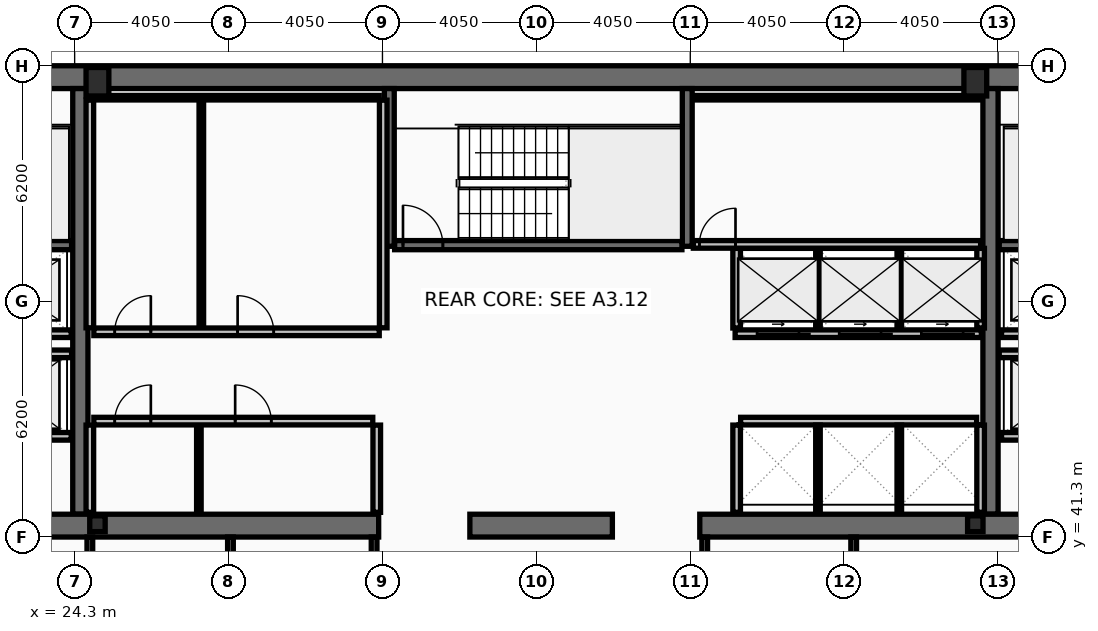
"""IFC4 building model, lengths in metres.
Left out: names, types, materials, properties, quantities, classifications, styles, units other than length and angle.
Written with IfcOpenShell. Run it as: python <this file> out.ifc"""

import sys

from ifc_helpers import new_model, si_unit, direction, frame, frame_2d, origin, origin_2d, place, context, subcontext, project, spatial, rectangle, hollow_rectangle, i_section, extrude, element, fill, save


model = new_model("IFC4")
c1 = context("Model", 3, precision=1e-05, world=origin(), true_north=direction((0.0, 1.0)))
c2 = subcontext(c1, "Body", "Model", "MODEL_VIEW")
j1 = project(units=[si_unit("LENGTHUNIT", "METRE"), si_unit("PLANEANGLEUNIT", "RADIAN")], contexts=[c1])
p1 = place(None, origin())
s1 = spatial("IfcSite", under=j1, at=p1, CompositionType="ELEMENT")
p2 = place(p1, origin())
s2 = spatial("IfcBuilding", under=s1, at=p2, CompositionType="ELEMENT")
p3 = place(p2, frame((0.0, 0.0, 231.8)))
s3 = spatial("IfcBuildingStorey", under=s2, at=p3, CompositionType="ELEMENT", Elevation=231.8)
p4 = place(p3, frame((16.2, 53.4, 0.0), z_axis=(0.0, 0.0, 1.0), x_axis=(1.0, 0.0, 0.0)))
e1 = element("IfcWall", 1, at=p4, inside=s3, PredefinedType="SHEAR", context=c2, shape_type="SweptSolid", body=[
    extrude(rectangle(XDim=40.5, YDim=0.6, at=frame_2d((20.25, 0.0))), origin(), (0.0, 0.0, 1.0), 3.44),
])
for number, where, z_axis, x_axis in (
    (2, (24.45, 41.9, 0.0), (0.0, 0.0, 1.0), (0.0, 1.0, 0.0)),
    (3, (48.4, 41.9, 0.0), (0.0, 0.0, 1.0), (0.0, 1.0, 0.0)),
):
    element("IfcWall", number, at=place(p3, frame(where, z_axis=z_axis, x_axis=x_axis)), inside=s3, PredefinedType="SHEAR", context=c2, shape_type="SweptSolid", body=[
        extrude(rectangle(XDim=11.2, YDim=0.4, at=frame_2d((5.6, 0.0))), origin(), (0.0, 0.0, 1.0), 3.44),
    ])
p5 = place(p3, frame((32.3, 41.6, 0.0), z_axis=(0.0, 0.0, 1.0), x_axis=(-1.0, 0.0, 0.0)))
e4 = element("IfcWall", 4, at=p5, inside=s3, PredefinedType="SHEAR", context=c2, shape_type="SweptSolid", body=[
    extrude(rectangle(XDim=11.45, YDim=0.6, at=frame_2d((5.725, 0.0))), origin(), (0.0, 0.0, 1.0), 3.44),
])
p6 = place(p3, frame((38.45, 41.6, 0.0), z_axis=(0.0, 0.0, 1.0), x_axis=(-1.0, 0.0, 0.0)))
e5 = element("IfcWall", 5, at=p6, inside=s3, PredefinedType="SHEAR", context=c2, shape_type="SweptSolid", body=[
    extrude(rectangle(XDim=3.75, YDim=0.6, at=frame_2d((1.875, 0.0))), origin(), (0.0, 0.0, 1.0), 3.44),
])
p7 = place(p3, frame((52.05, 41.6, 0.0), z_axis=(0.0, 0.0, 1.0), x_axis=(-1.0, 0.0, 0.0)))
e6 = element("IfcWall", 6, at=p7, inside=s3, PredefinedType="SHEAR", context=c2, shape_type="SweptSolid", body=[
    extrude(rectangle(XDim=11.3, YDim=0.6, at=frame_2d((5.65, 0.0))), origin(), (0.0, 0.0, 1.0), 3.44),
])
for number, where, z_axis, x_axis in (
    (7, (32.58, 48.95, 0.0), (0.0, 0.0, 1.0), (0.0, 1.0, 0.0)),
    (8, (40.42, 48.95, 0.0), (0.0, 0.0, 1.0), (0.0, 1.0, 0.0)),
):
    element("IfcWall", number, at=place(p3, frame(where, z_axis=z_axis, x_axis=x_axis)), inside=s3, PredefinedType="SHEAR", context=c2, shape_type="SweptSolid", body=[
        extrude(rectangle(XDim=4.15, YDim=0.26, at=frame_2d((2.075, 0.0))), origin(), (0.0, 0.0, 1.0), 3.44),
    ])
p8 = place(p3, frame((16.8, 48.98, 0.0), z_axis=(0.0, 0.0, 1.0), x_axis=(1.0, 0.0, 0.0)))
e9 = element("IfcWall", 9, at=p8, inside=s3, PredefinedType="SHEAR", context=c2, shape_type="SweptSolid", body=[
    extrude(rectangle(XDim=7.42, YDim=0.24, at=frame_2d((3.71, 0.0))), origin(), (0.0, 0.0, 1.0), 3.44),
])
p9 = place(p8, frame((0.22, 0.0, 0.0)))
e10 = element("IfcOpeningElement", 10, at=p9, cuts=e9, PredefinedType="OPENING", context=c2, shape_type="SweptSolid", body=[
    extrude(rectangle(XDim=1.05, YDim=2.15, at=frame_2d((0.525, 1.075))), frame((0.0, 0.13, 0.0), z_axis=(0.0, -1.0, 0.0), x_axis=(1.0, 0.0, 0.0)), (0.0, 0.0, 1.0), 0.26),
])
p10 = place(p3, frame((48.63, 48.98, 0.0), z_axis=(0.0, 0.0, 1.0), x_axis=(1.0, 0.0, 0.0)))
e11 = element("IfcWall", 11, at=p10, inside=s3, PredefinedType="SHEAR", context=c2, shape_type="SweptSolid", body=[
    extrude(rectangle(XDim=7.47, YDim=0.24, at=frame_2d((3.735, 0.0))), origin(), (0.0, 0.0, 1.0), 3.44),
])
p11 = place(p10, frame((6.2, 0.0, 0.0)))
e12 = element("IfcOpeningElement", 12, at=p11, cuts=e11, PredefinedType="OPENING", context=c2, shape_type="SweptSolid", body=[
    extrude(rectangle(XDim=1.05, YDim=2.15, at=frame_2d((0.525, 1.075))), frame((0.0, 0.13, 0.0), z_axis=(0.0, -1.0, 0.0), x_axis=(1.0, 0.0, 0.0)), (0.0, 0.0, 1.0), 0.26),
])
p12 = place(p3, frame((32.72, 48.98, 0.0), z_axis=(0.0, 0.0, 1.0), x_axis=(1.0, 0.0, 0.0)))
e13 = element("IfcWall", 13, at=p12, inside=s3, PredefinedType="SHEAR", context=c2, shape_type="SweptSolid", body=[
    extrude(rectangle(XDim=7.56, YDim=0.24, at=frame_2d((3.78, 0.0))), origin(), (0.0, 0.0, 1.0), 3.44),
])
p13 = place(p12, frame((0.22, 0.0, 0.0)))
e14 = element("IfcOpeningElement", 14, at=p13, cuts=e13, PredefinedType="OPENING", context=c2, shape_type="SweptSolid", body=[
    extrude(rectangle(XDim=1.05, YDim=2.15, at=frame_2d((0.525, 1.075))), frame((0.0, 0.13, 0.0), z_axis=(0.0, -1.0, 0.0), x_axis=(1.0, 0.0, 0.0)), (0.0, 0.0, 1.0), 0.26),
])
for number, where, z_axis, x_axis in (
    (15, (24.9, 53.28, 0.0), (0.0, 0.0, 1.0), (1.0, 0.0, 0.0)),
    (16, (48.0, 53.28, 0.0), (0.0, 0.0, 1.0), (1.0, 0.0, 0.0)),
):
    element("IfcColumn", number, at=place(p3, frame(where, z_axis=z_axis, x_axis=x_axis)), inside=s3, PredefinedType="COLUMN", context=c2, shape_type="SweptSolid", body=[
        extrude(hollow_rectangle(XDim=0.6, YDim=0.75, WallThickness=0.045, at=origin_2d()), origin(), (0.0, 0.0, 1.0), 3.6),
    ])
for number, where, z_axis, x_axis in (
    (17, (24.9, 41.65, 0.0), (0.0, 0.0, 1.0), (1.0, 0.0, 0.0)),
    (18, (48.0, 41.65, 0.0), (0.0, 0.0, 1.0), (1.0, 0.0, 0.0)),
):
    element("IfcColumn", number, at=place(p3, frame(where, z_axis=z_axis, x_axis=x_axis)), inside=s3, PredefinedType="COLUMN", context=c2, shape_type="SweptSolid", body=[
        extrude(i_section(OverallWidth=0.406, OverallDepth=0.416, WebThickness=0.03, FlangeThickness=0.048, at=origin_2d()), origin(), (0.0, 0.0, 1.0), 3.6),
    ])
p14 = place(p3, frame((51.61, 43.95, 0.0), z_axis=(0.0, 0.0, 1.0), x_axis=(-1.0, 0.0, 0.0)))
e19 = element("IfcWall", 19, at=p14, inside=s3, PredefinedType="PARTITIONING", context=c2, shape_type="SweptSolid", body=[
    extrude(rectangle(XDim=2.92, YDim=0.2, at=frame_2d((1.46, 0.0))), origin(), (0.0, 0.0, 1.0), 3.44),
])
p15 = place(p14, frame((0.81, 0.0, 0.0)))
e20 = element("IfcOpeningElement", 20, at=p15, cuts=e19, PredefinedType="OPENING", context=c2, shape_type="SweptSolid", body=[
    extrude(rectangle(XDim=1.3, YDim=2.18, at=frame_2d((0.65, 1.09))), frame((0.0, 0.11, 0.0), z_axis=(0.0, -1.0, 0.0), x_axis=(1.0, 0.0, 0.0)), (0.0, 0.0, 1.0), 0.22),
])
p16 = place(p3, frame((24.21, 43.95, 0.0), z_axis=(0.0, 0.0, 1.0), x_axis=(-1.0, 0.0, 0.0)))
e21 = element("IfcWall", 21, at=p16, inside=s3, PredefinedType="PARTITIONING", context=c2, shape_type="SweptSolid", body=[
    extrude(rectangle(XDim=2.97, YDim=0.2, at=frame_2d((1.485, 0.0))), origin(), (0.0, 0.0, 1.0), 3.44),
])
p17 = place(p16, frame((0.86, 0.0, 0.0)))
e22 = element("IfcOpeningElement", 22, at=p17, cuts=e21, PredefinedType="OPENING", context=c2, shape_type="SweptSolid", body=[
    extrude(rectangle(XDim=1.3, YDim=2.18, at=frame_2d((0.65, 1.09))), frame((0.0, 0.11, 0.0), z_axis=(0.0, -1.0, 0.0), x_axis=(1.0, 0.0, 0.0)), (0.0, 0.0, 1.0), 0.22),
])
p18 = place(p3, frame((51.61, 46.65, 0.0), z_axis=(0.0, 0.0, 1.0), x_axis=(-1.0, 0.0, 0.0)))
e23 = element("IfcWall", 23, at=p18, inside=s3, PredefinedType="PARTITIONING", context=c2, shape_type="SweptSolid", body=[
    extrude(rectangle(XDim=2.92, YDim=0.2, at=frame_2d((1.46, 0.0))), origin(), (0.0, 0.0, 1.0), 3.44),
])
p19 = place(p18, frame((0.86, 0.0, 0.0)))
e24 = element("IfcOpeningElement", 24, at=p19, cuts=e23, PredefinedType="OPENING", context=c2, shape_type="SweptSolid", body=[
    extrude(rectangle(XDim=1.2, YDim=2.18, at=frame_2d((0.6, 1.09))), frame((0.0, 0.11, 0.0), z_axis=(0.0, -1.0, 0.0), x_axis=(1.0, 0.0, 0.0)), (0.0, 0.0, 1.0), 0.22),
])
p20 = place(p3, frame((24.21, 46.65, 0.0), z_axis=(0.0, 0.0, 1.0), x_axis=(-1.0, 0.0, 0.0)))
e25 = element("IfcWall", 25, at=p20, inside=s3, PredefinedType="PARTITIONING", context=c2, shape_type="SweptSolid", body=[
    extrude(rectangle(XDim=2.97, YDim=0.2, at=frame_2d((1.485, 0.0))), origin(), (0.0, 0.0, 1.0), 3.44),
])
p21 = place(p20, frame((0.91, 0.0, 0.0)))
e26 = element("IfcOpeningElement", 26, at=p21, cuts=e25, PredefinedType="OPENING", context=c2, shape_type="SweptSolid", body=[
    extrude(rectangle(XDim=1.2, YDim=2.18, at=frame_2d((0.6, 1.09))), frame((0.0, 0.11, 0.0), z_axis=(0.0, -1.0, 0.0), x_axis=(1.0, 0.0, 0.0)), (0.0, 0.0, 1.0), 0.22),
])
p22 = place(p3, frame((48.16, 46.65, 0.0), z_axis=(0.0, 0.0, 1.0), x_axis=(-1.0, 0.0, 0.0)))
e27 = element("IfcWall", 27, at=p22, inside=s3, PredefinedType="PARTITIONING", context=c2, shape_type="SweptSolid", body=[
    extrude(rectangle(XDim=6.48, YDim=0.2, at=frame_2d((3.24, 0.0))), origin(), (0.0, 0.0, 1.0), 3.44),
])
p23 = place(p22, frame((4.8, 0.0, 0.0)))
e28 = element("IfcOpeningElement", 28, at=p23, cuts=e27, PredefinedType="OPENING", context=c2, shape_type="SweptSolid", body=[
    extrude(rectangle(XDim=1.1, YDim=2.18, at=frame_2d((0.55, 1.09))), frame((0.0, 0.11, 0.0), z_axis=(0.0, -1.0, 0.0), x_axis=(1.0, 0.0, 0.0)), (0.0, 0.0, 1.0), 0.22),
])
p24 = place(p22, frame((2.64, 0.0, 0.0)))
e29 = element("IfcOpeningElement", 29, at=p24, cuts=e27, PredefinedType="OPENING", context=c2, shape_type="SweptSolid", body=[
    extrude(rectangle(XDim=1.1, YDim=2.18, at=frame_2d((0.55, 1.09))), frame((0.0, 0.11, 0.0), z_axis=(0.0, -1.0, 0.0), x_axis=(1.0, 0.0, 0.0)), (0.0, 0.0, 1.0), 0.22),
])
p25 = place(p22, frame((0.48, 0.0, 0.0)))
e30 = element("IfcOpeningElement", 30, at=p25, cuts=e27, PredefinedType="OPENING", context=c2, shape_type="SweptSolid", body=[
    extrude(rectangle(XDim=1.1, YDim=2.18, at=frame_2d((0.55, 1.09))), frame((0.0, 0.11, 0.0), z_axis=(0.0, -1.0, 0.0), x_axis=(1.0, 0.0, 0.0)), (0.0, 0.0, 1.0), 0.22),
])
p26 = place(p3, frame((21.2, 46.12, 0.0), z_axis=(0.0, 0.0, 1.0), x_axis=(1.0, 0.0, 0.0)))
e31 = element("IfcWall", 31, at=p26, inside=s3, PredefinedType="PARTITIONING", context=c2, shape_type="SweptSolid", body=[
    extrude(rectangle(XDim=3.02, YDim=0.2, at=frame_2d((1.51, 0.0))), origin(), (0.0, 0.0, 1.0), 3.44),
])
p27 = place(p3, frame((48.63, 46.12, 0.0), z_axis=(0.0, 0.0, 1.0), x_axis=(1.0, 0.0, 0.0)))
e32 = element("IfcWall", 32, at=p27, inside=s3, PredefinedType="PARTITIONING", context=c2, shape_type="SweptSolid", body=[
    extrude(rectangle(XDim=3.07, YDim=0.2, at=frame_2d((1.535, 0.0))), origin(), (0.0, 0.0, 1.0), 3.44),
])
for number, where, z_axis, x_axis in (
    (33, (24.7, 46.805, 0.0), (0.0, 0.0, 1.0), (0.0, 1.0, 0.0)),
    (34, (32.42, 46.805, 0.0), (0.0, 0.0, 1.0), (0.0, 1.0, 0.0)),
):
    element("IfcWall", number, at=place(p3, frame(where, z_axis=z_axis, x_axis=x_axis)), inside=s3, PredefinedType="PARTITIONING", context=c2, shape_type="SweptSolid", body=[
        extrude(rectangle(XDim=5.99, YDim=0.2, at=frame_2d((2.995, 0.0))), origin(), (0.0, 0.0, 1.0), 3.44),
    ])
p28 = place(p3, frame((24.805, 52.86, 0.0), z_axis=(0.0, 0.0, 1.0), x_axis=(1.0, 0.0, 0.0)))
e35 = element("IfcWall", 35, at=p28, inside=s3, PredefinedType="PARTITIONING", context=c2, shape_type="SweptSolid", body=[
    extrude(rectangle(XDim=7.51, YDim=0.12, at=frame_2d((3.755, 0.0))), origin(), (0.0, 0.0, 1.0), 3.44),
])
p29 = place(p3, frame((27.634, 46.805, 0.0), z_axis=(0.0, 0.0, 1.0), x_axis=(0.0, 1.0, 0.0)))
e36 = element("IfcWall", 36, at=p29, inside=s3, PredefinedType="PARTITIONING", context=c2, shape_type="SweptSolid", body=[
    extrude(rectangle(XDim=5.99, YDim=0.12, at=frame_2d((2.995, 0.0))), origin(), (0.0, 0.0, 1.0), 3.44),
])
p30 = place(p3, frame((24.805, 46.7, 0.0), z_axis=(0.0, 0.0, 1.0), x_axis=(1.0, 0.0, 0.0)))
e37 = element("IfcWall", 37, at=p30, inside=s3, PredefinedType="PARTITIONING", context=c2, shape_type="SweptSolid", body=[
    extrude(rectangle(XDim=7.51, YDim=0.2, at=frame_2d((3.755, 0.0))), origin(), (0.0, 0.0, 1.0), 3.44),
])
p31 = place(p30, frame((0.55, 0.0, 0.0)))
e38 = element("IfcOpeningElement", 38, at=p31, cuts=e37, PredefinedType="OPENING", context=c2, shape_type="SweptSolid", body=[
    extrude(rectangle(XDim=0.95, YDim=2.1, at=frame_2d((0.475, 1.05))), frame((0.0, 0.11, 0.0), z_axis=(0.0, -1.0, 0.0), x_axis=(1.0, 0.0, 0.0)), (0.0, 0.0, 1.0), 0.22),
])
p32 = place(p30, frame((3.784, 0.0, 0.0)))
e39 = element("IfcOpeningElement", 39, at=p32, cuts=e37, PredefinedType="OPENING", context=c2, shape_type="SweptSolid", body=[
    extrude(rectangle(XDim=0.95, YDim=2.1, at=frame_2d((0.475, 1.05))), frame((0.0, 0.11, 0.0), z_axis=(0.0, -1.0, 0.0), x_axis=(1.0, 0.0, 0.0)), (0.0, 0.0, 1.0), 0.22),
])
for number, where, z_axis, x_axis in (
    (40, (24.7, 41.95, 0.0), (0.0, 0.0, 1.0), (0.0, 1.0, 0.0)),
    (41, (32.25, 41.95, 0.0), (0.0, 0.0, 1.0), (0.0, 1.0, 0.0)),
):
    element("IfcWall", number, at=place(p3, frame(where, z_axis=z_axis, x_axis=x_axis)), inside=s3, PredefinedType="PARTITIONING", context=c2, shape_type="SweptSolid", body=[
        extrude(rectangle(XDim=2.295, YDim=0.2, at=frame_2d((1.147, 0.0))), origin(), (0.0, 0.0, 1.0), 3.44),
    ])
p33 = place(p3, frame((27.569, 41.95, 0.0), z_axis=(0.0, 0.0, 1.0), x_axis=(0.0, 1.0, 0.0)))
e42 = element("IfcWall", 42, at=p33, inside=s3, PredefinedType="PARTITIONING", context=c2, shape_type="SweptSolid", body=[
    extrude(rectangle(XDim=2.295, YDim=0.12, at=frame_2d((1.147, 0.0))), origin(), (0.0, 0.0, 1.0), 3.44),
])
p34 = place(p3, frame((24.805, 44.35, 0.0), z_axis=(0.0, 0.0, 1.0), x_axis=(1.0, 0.0, 0.0)))
e43 = element("IfcWall", 43, at=p34, inside=s3, PredefinedType="PARTITIONING", context=c2, shape_type="SweptSolid", body=[
    extrude(rectangle(XDim=7.34, YDim=0.2, at=frame_2d((3.67, 0.0))), origin(), (0.0, 0.0, 1.0), 3.44),
])
p35 = place(p34, frame((0.55, 0.0, 0.0)))
e44 = element("IfcOpeningElement", 44, at=p35, cuts=e43, PredefinedType="OPENING", context=c2, shape_type="SweptSolid", body=[
    extrude(rectangle(XDim=0.95, YDim=2.1, at=frame_2d((0.475, 1.05))), frame((0.0, 0.11, 0.0), z_axis=(0.0, -1.0, 0.0), x_axis=(1.0, 0.0, 0.0)), (0.0, 0.0, 1.0), 0.22),
])
p36 = place(p34, frame((3.719, 0.0, 0.0)))
e45 = element("IfcOpeningElement", 45, at=p36, cuts=e43, PredefinedType="OPENING", context=c2, shape_type="SweptSolid", body=[
    extrude(rectangle(XDim=0.95, YDim=2.1, at=frame_2d((0.475, 1.05))), frame((0.0, 0.11, 0.0), z_axis=(0.0, -1.0, 0.0), x_axis=(1.0, 0.0, 0.0)), (0.0, 0.0, 1.0), 0.22),
])
for number, where, z_axis, x_axis in (
    (46, (41.72, 46.8, 0.0), (0.0, 0.0, 1.0), (0.0, 1.0, 0.0)),
    (47, (48.14, 46.8, 0.0), (0.0, 0.0, 1.0), (0.0, 1.0, 0.0)),
):
    element("IfcWall", number, at=place(p3, frame(where, z_axis=z_axis, x_axis=x_axis)), inside=s3, PredefinedType="PARTITIONING", context=c2, shape_type="SweptSolid", body=[
        extrude(rectangle(XDim=2.095, YDim=0.2, at=frame_2d((1.047, 0.0))), origin(), (0.0, 0.0, 1.0), 3.44),
    ])
for number, where, z_axis, x_axis in (
    (48, (43.86, 46.8, 0.0), (0.0, 0.0, 1.0), (0.0, 1.0, 0.0)),
    (49, (46.0, 46.8, 0.0), (0.0, 0.0, 1.0), (0.0, 1.0, 0.0)),
):
    element("IfcWall", number, at=place(p3, frame(where, z_axis=z_axis, x_axis=x_axis)), inside=s3, PredefinedType="PARTITIONING", context=c2, shape_type="SweptSolid", body=[
        extrude(rectangle(XDim=2.095, YDim=0.12, at=frame_2d((1.047, 0.0))), origin(), (0.0, 0.0, 1.0), 3.44),
    ])
p37 = place(p3, frame((41.825, 44.35, 0.0), z_axis=(0.0, 0.0, 1.0), x_axis=(1.0, 0.0, 0.0)))
e50 = element("IfcWall", 50, at=p37, inside=s3, PredefinedType="PARTITIONING", context=c2, shape_type="SweptSolid", body=[
    extrude(rectangle(XDim=6.21, YDim=0.2, at=frame_2d((3.105, 0.0))), origin(), (0.0, 0.0, 1.0), 3.44),
])
for number, where, z_axis, x_axis in (
    (51, (41.72, 41.95, 0.0), (0.0, 0.0, 1.0), (0.0, 1.0, 0.0)),
    (52, (48.14, 41.95, 0.0), (0.0, 0.0, 1.0), (0.0, 1.0, 0.0)),
):
    element("IfcWall", number, at=place(p3, frame(where, z_axis=z_axis, x_axis=x_axis)), inside=s3, PredefinedType="PARTITIONING", context=c2, shape_type="SweptSolid", body=[
        extrude(rectangle(XDim=2.295, YDim=0.2, at=frame_2d((1.147, 0.0))), origin(), (0.0, 0.0, 1.0), 3.44),
    ])
for number, where, z_axis, x_axis in (
    (53, (43.86, 41.95, 0.0), (0.0, 0.0, 1.0), (0.0, 1.0, 0.0)),
    (54, (46.0, 41.95, 0.0), (0.0, 0.0, 1.0), (0.0, 1.0, 0.0)),
):
    element("IfcWall", number, at=place(p3, frame(where, z_axis=z_axis, x_axis=x_axis)), inside=s3, PredefinedType="PARTITIONING", context=c2, shape_type="SweptSolid", body=[
        extrude(rectangle(XDim=2.295, YDim=0.12, at=frame_2d((1.147, 0.0))), origin(), (0.0, 0.0, 1.0), 3.44),
    ])
p38 = place(p3, frame((40.58, 52.86, 0.0), z_axis=(0.0, 0.0, 1.0), x_axis=(1.0, 0.0, 0.0)))
e55 = element("IfcWall", 55, at=p38, inside=s3, PredefinedType="PARTITIONING", context=c2, shape_type="SweptSolid", body=[
    extrude(rectangle(XDim=7.56, YDim=0.12, at=frame_2d((3.78, 0.0))), origin(), (0.0, 0.0, 1.0), 3.44),
])
p39 = place(p3, frame((40.58, 49.0, 0.0), z_axis=(0.0, 0.0, 1.0), x_axis=(1.0, 0.0, 0.0)))
e56 = element("IfcWall", 56, at=p39, inside=s3, PredefinedType="PARTITIONING", context=c2, shape_type="SweptSolid", body=[
    extrude(rectangle(XDim=7.56, YDim=0.2, at=frame_2d((3.78, 0.0))), origin(), (0.0, 0.0, 1.0), 3.44),
])
p40 = place(p39, frame((0.16, 0.0, 0.0)))
e57 = element("IfcOpeningElement", 57, at=p40, cuts=e56, PredefinedType="OPENING", context=c2, shape_type="SweptSolid", body=[
    extrude(rectangle(XDim=0.95, YDim=2.1, at=frame_2d((0.475, 1.05))), frame((0.0, 0.11, 0.0), z_axis=(0.0, -1.0, 0.0), x_axis=(1.0, 0.0, 0.0)), (0.0, 0.0, 1.0), 0.22),
])
p41 = place(p3, frame((24.7, 38.28, 0.0), z_axis=(0.0, 0.0, 1.0), x_axis=(0.0, 1.0, 0.0)))
e58 = element("IfcWall", 58, at=p41, inside=s3, PredefinedType="PARTITIONING", context=c2, shape_type="SweptSolid", body=[
    extrude(rectangle(XDim=3.02, YDim=0.15, at=frame_2d((1.51, 0.0))), origin(), (0.0, 0.0, 1.0), 2.78),
])
for number, where, z_axis, x_axis in (
    (59, (28.4, 38.28, 0.0), (0.0, 0.0, 1.0), (0.0, 1.0, 0.0)),
    (60, (32.18, 38.28, 0.0), (0.0, 0.0, 1.0), (0.0, 1.0, 0.0)),
    (61, (40.88, 38.28, 0.0), (0.0, 0.0, 1.0), (0.0, 1.0, 0.0)),
    (62, (44.8, 38.28, 0.0), (0.0, 0.0, 1.0), (0.0, 1.0, 0.0)),
):
    element("IfcWall", number, at=place(p3, frame(where, z_axis=z_axis, x_axis=x_axis)), inside=s3, PredefinedType="PARTITIONING", context=c2, shape_type="SweptSolid", body=[
        extrude(rectangle(XDim=3.02, YDim=0.15, at=frame_2d((1.51, 0.0))), origin(), (0.0, 0.0, 1.0), 3.44),
    ])
p42 = place(p13, origin())
e63 = element("IfcDoor", 63, at=p42, inside=s3, OperationType="SINGLE_SWING_LEFT", PredefinedType="DOOR", context=c2, shape_type="SweptSolid", body=[
    extrude(rectangle(XDim=1.05, YDim=2.15, at=frame_2d((0.525, 1.075))), frame((0.0, 0.025, 0.0), z_axis=(0.0, -1.0, 0.0), x_axis=(1.0, 0.0, 0.0)), (0.0, 0.0, 1.0), 0.05),
])
fill(e14, e63)
p43 = place(p23, origin())
e64 = element("IfcDoor", 64, at=p43, inside=s3, OperationType="SLIDING_TO_LEFT", PredefinedType="DOOR", context=c2, shape_type="SweptSolid", body=[
    extrude(rectangle(XDim=1.1, YDim=2.18, at=frame_2d((0.55, 1.09))), frame((0.0, 0.025, 0.0), z_axis=(0.0, -1.0, 0.0), x_axis=(1.0, 0.0, 0.0)), (0.0, 0.0, 1.0), 0.05),
])
fill(e28, e64)
p44 = place(p24, origin())
e65 = element("IfcDoor", 65, at=p44, inside=s3, OperationType="SLIDING_TO_LEFT", PredefinedType="DOOR", context=c2, shape_type="SweptSolid", body=[
    extrude(rectangle(XDim=1.1, YDim=2.18, at=frame_2d((0.55, 1.09))), frame((0.0, 0.025, 0.0), z_axis=(0.0, -1.0, 0.0), x_axis=(1.0, 0.0, 0.0)), (0.0, 0.0, 1.0), 0.05),
])
fill(e29, e65)
p45 = place(p25, origin())
e66 = element("IfcDoor", 66, at=p45, inside=s3, OperationType="SLIDING_TO_LEFT", PredefinedType="DOOR", context=c2, shape_type="SweptSolid", body=[
    extrude(rectangle(XDim=1.1, YDim=2.18, at=frame_2d((0.55, 1.09))), frame((0.0, 0.025, 0.0), z_axis=(0.0, -1.0, 0.0), x_axis=(1.0, 0.0, 0.0)), (0.0, 0.0, 1.0), 0.05),
])
fill(e30, e66)
p46 = place(p31, origin())
e67 = element("IfcDoor", 67, at=p46, inside=s3, OperationType="SINGLE_SWING_RIGHT", PredefinedType="DOOR", context=c2, shape_type="SweptSolid", body=[
    extrude(rectangle(XDim=0.95, YDim=2.1, at=frame_2d((0.475, 1.05))), frame((0.0, 0.025, 0.0), z_axis=(0.0, -1.0, 0.0), x_axis=(1.0, 0.0, 0.0)), (0.0, 0.0, 1.0), 0.05),
])
fill(e38, e67)
p47 = place(p32, origin())
e68 = element("IfcDoor", 68, at=p47, inside=s3, OperationType="SINGLE_SWING_LEFT", PredefinedType="DOOR", context=c2, shape_type="SweptSolid", body=[
    extrude(rectangle(XDim=0.95, YDim=2.1, at=frame_2d((0.475, 1.05))), frame((0.0, 0.025, 0.0), z_axis=(0.0, -1.0, 0.0), x_axis=(1.0, 0.0, 0.0)), (0.0, 0.0, 1.0), 0.05),
])
fill(e39, e68)
p48 = place(p35, origin())
e69 = element("IfcDoor", 69, at=p48, inside=s3, OperationType="SINGLE_SWING_RIGHT", PredefinedType="DOOR", context=c2, shape_type="SweptSolid", body=[
    extrude(rectangle(XDim=0.95, YDim=2.1, at=frame_2d((0.475, 1.05))), frame((0.0, 0.025, 0.0), z_axis=(0.0, -1.0, 0.0), x_axis=(1.0, 0.0, 0.0)), (0.0, 0.0, 1.0), 0.05),
])
fill(e44, e69)
p49 = place(p36, origin())
e70 = element("IfcDoor", 70, at=p49, inside=s3, OperationType="SINGLE_SWING_LEFT", PredefinedType="DOOR", context=c2, shape_type="SweptSolid", body=[
    extrude(rectangle(XDim=0.95, YDim=2.1, at=frame_2d((0.475, 1.05))), frame((0.0, 0.025, 0.0), z_axis=(0.0, -1.0, 0.0), x_axis=(1.0, 0.0, 0.0)), (0.0, 0.0, 1.0), 0.05),
])
fill(e45, e70)
p50 = place(p40, origin())
e71 = element("IfcDoor", 71, at=p50, inside=s3, OperationType="SINGLE_SWING_RIGHT", PredefinedType="DOOR", context=c2, shape_type="SweptSolid", body=[
    extrude(rectangle(XDim=0.95, YDim=2.1, at=frame_2d((0.475, 1.05))), frame((0.0, 0.025, 0.0), z_axis=(0.0, -1.0, 0.0), x_axis=(1.0, 0.0, 0.0)), (0.0, 0.0, 1.0), 0.05),
])
fill(e57, e71)
save(model, sys.argv[1])
